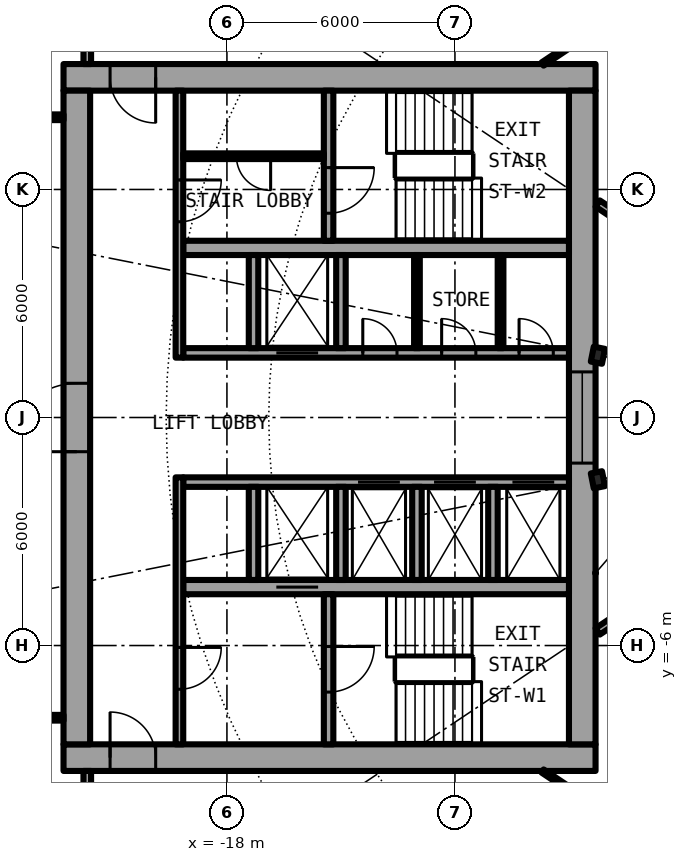
"""IFC4 building model, lengths in metres.
Left out: names, types, materials, properties, quantities, classifications, styles, units other than length and angle.
Written with IfcOpenShell. Run it as: python <this file> out.ifc"""

import sys

from ifc_helpers import new_model, si_unit, direction, frame, frame_2d, origin, origin_2d, place, context, subcontext, project, spatial, rectangle, i_section, extrude, element, fill, save


model = new_model("IFC4")
c1 = context("Model", 3, precision=1e-05, world=origin(), true_north=direction((0.0, 1.0)))
c2 = subcontext(c1, "Body", "Model", "MODEL_VIEW")
j1 = project(units=[si_unit("LENGTHUNIT", "METRE"), si_unit("PLANEANGLEUNIT", "RADIAN")], contexts=[c1])
p1 = place(None, origin())
s1 = spatial("IfcSite", under=j1, at=p1, CompositionType="ELEMENT")
p2 = place(p1, origin())
s2 = spatial("IfcBuilding", under=s1, at=p2, CompositionType="ELEMENT")
p3 = place(p2, frame((0.0, 0.0, 88.0)))
s3 = spatial("IfcBuildingStorey", under=s2, at=p3, CompositionType="ELEMENT", Elevation=88.0)
for number, where, z_axis, x_axis in (
    (1, (-8.239, 1.639, 0.0), (0.0, 0.0, 1.0), (-0.981, 0.195, 0.0)),
    (2, (-8.239, -1.639, 0.0), (0.0, 0.0, 1.0), (-0.981, -0.195, 0.0)),
):
    element("IfcColumn", number, at=place(p3, frame(where, z_axis=z_axis, x_axis=x_axis)), inside=s3, PredefinedType="COLUMN", context=c2, shape_type="SweptSolid", body=[
        extrude(i_section(OverallWidth=0.3, OverallDepth=0.4, WebThickness=0.013, FlangeThickness=0.024, FilletRadius=0.027, at=origin_2d()), origin(), (0.0, 0.0, 1.0), 3.05),
    ])
p4 = place(p3, frame((-22.3, -8.95, 0.0), z_axis=(0.0, 0.0, 1.0), x_axis=(1.0, 0.0, 0.0)))
e3 = element("IfcWall", 3, at=p4, inside=s3, PredefinedType="SHEAR", context=c2, shape_type="SweptSolid", body=[
    extrude(rectangle(XDim=14.0, YDim=0.7, at=frame_2d((7.0, 0.0))), origin(), (0.0, 0.0, 1.0), 3.05),
])
p5 = place(p4, frame((1.225, 0.0, 0.0)))
e4 = element("IfcOpeningElement", 4, at=p5, cuts=e3, PredefinedType="OPENING", context=c2, shape_type="SweptSolid", body=[
    extrude(rectangle(XDim=1.2, YDim=2.3, at=frame_2d((0.6, 1.15))), frame((0.0, 0.36, 0.0), z_axis=(0.0, -1.0, 0.0), x_axis=(1.0, 0.0, 0.0)), (0.0, 0.0, 1.0), 0.72),
])
p6 = place(p3, frame((-8.3, 8.95, 0.0), z_axis=(0.0, 0.0, 1.0), x_axis=(-1.0, 0.0, 0.0)))
e5 = element("IfcWall", 5, at=p6, inside=s3, PredefinedType="SHEAR", context=c2, shape_type="SweptSolid", body=[
    extrude(rectangle(XDim=14.0, YDim=0.7, at=frame_2d((7.0, 0.0))), origin(), (0.0, 0.0, 1.0), 3.05),
])
p7 = place(p6, frame((11.575, 0.0, 0.0)))
e6 = element("IfcOpeningElement", 6, at=p7, cuts=e5, PredefinedType="OPENING", context=c2, shape_type="SweptSolid", body=[
    extrude(rectangle(XDim=1.2, YDim=2.3, at=frame_2d((0.6, 1.15))), frame((0.0, 0.36, 0.0), z_axis=(0.0, -1.0, 0.0), x_axis=(1.0, 0.0, 0.0)), (0.0, 0.0, 1.0), 0.72),
])
p8 = place(p3, frame((-21.95, -8.6, 0.0), z_axis=(0.0, 0.0, 1.0), x_axis=(0.0, 1.0, 0.0)))
e7 = element("IfcWall", 7, at=p8, inside=s3, PredefinedType="SHEAR", context=c2, shape_type="SweptSolid", body=[
    extrude(rectangle(XDim=17.2, YDim=0.7, at=frame_2d((8.6, 0.0))), origin(), (0.0, 0.0, 1.0), 3.05),
])
p9 = place(p8, frame((7.7, 0.0, 0.0)))
e8 = element("IfcOpeningElement", 8, at=p9, cuts=e7, PredefinedType="OPENING", context=c2, shape_type="SweptSolid", body=[
    extrude(rectangle(XDim=1.8, YDim=2.3, at=frame_2d((0.9, 1.15))), frame((0.0, 0.36, 0.0), z_axis=(0.0, -1.0, 0.0), x_axis=(1.0, 0.0, 0.0)), (0.0, 0.0, 1.0), 0.72),
])
p10 = place(p3, frame((-8.65, 8.6, 0.0), z_axis=(0.0, 0.0, 1.0), x_axis=(0.0, -1.0, 0.0)))
e9 = element("IfcWall", 9, at=p10, inside=s3, PredefinedType="SHEAR", context=c2, shape_type="SweptSolid", body=[
    extrude(rectangle(XDim=17.2, YDim=0.7, at=frame_2d((8.6, 0.0))), origin(), (0.0, 0.0, 1.0), 3.05),
])
p11 = place(p10, frame((7.4, 0.0, 0.1)))
e10 = element("IfcOpeningElement", 10, at=p11, cuts=e9, PredefinedType="OPENING", context=c2, shape_type="SweptSolid", body=[
    extrude(rectangle(XDim=2.4, YDim=2.2, at=frame_2d((1.2, 1.1))), frame((0.0, 0.36, 0.0), z_axis=(0.0, -1.0, 0.0), x_axis=(1.0, 0.0, 0.0)), (0.0, 0.0, 1.0), 0.72),
])
p12 = place(p3, frame((-9.0, -1.7, 0.0), z_axis=(0.0, 0.0, 1.0), x_axis=(-1.0, 0.0, 0.0)))
e11 = element("IfcWall", 11, at=p12, inside=s3, PredefinedType="SHEAR", context=c2, shape_type="SweptSolid", body=[
    extrude(rectangle(XDim=10.15, YDim=0.25, at=frame_2d((5.075, 0.0))), origin(), (0.0, 0.0, 1.0), 3.05),
])
p13 = place(p12, frame((0.387, 0.0, 0.0)))
e12 = element("IfcOpeningElement", 12, at=p13, cuts=e11, PredefinedType="OPENING", context=c2, shape_type="SweptSolid", body=[
    extrude(rectangle(XDim=1.1, YDim=2.3, at=frame_2d((0.55, 1.15))), frame((0.0, 0.135, 0.0), z_axis=(0.0, -1.0, 0.0), x_axis=(1.0, 0.0, 0.0)), (0.0, 0.0, 1.0), 0.27),
])
p14 = place(p12, frame((2.45, 0.0, 0.0)))
e13 = element("IfcOpeningElement", 13, at=p14, cuts=e11, PredefinedType="OPENING", context=c2, shape_type="SweptSolid", body=[
    extrude(rectangle(XDim=1.1, YDim=2.3, at=frame_2d((0.55, 1.15))), frame((0.0, 0.135, 0.0), z_axis=(0.0, -1.0, 0.0), x_axis=(1.0, 0.0, 0.0)), (0.0, 0.0, 1.0), 0.27),
])
p15 = place(p12, frame((4.45, 0.0, 0.0)))
e14 = element("IfcOpeningElement", 14, at=p15, cuts=e11, PredefinedType="OPENING", context=c2, shape_type="SweptSolid", body=[
    extrude(rectangle(XDim=1.1, YDim=2.3, at=frame_2d((0.55, 1.15))), frame((0.0, 0.135, 0.0), z_axis=(0.0, -1.0, 0.0), x_axis=(1.0, 0.0, 0.0)), (0.0, 0.0, 1.0), 0.27),
])
p16 = place(p3, frame((-9.0, -4.462, 0.0), z_axis=(0.0, 0.0, 1.0), x_axis=(-1.0, 0.0, 0.0)))
e15 = element("IfcWall", 15, at=p16, inside=s3, PredefinedType="SHEAR", context=c2, shape_type="SweptSolid", body=[
    extrude(rectangle(XDim=10.15, YDim=0.375, at=frame_2d((5.075, 0.0))), origin(), (0.0, 0.0, 1.0), 3.05),
])
p17 = place(p16, frame((6.6, 0.0, 0.0)))
e16 = element("IfcOpeningElement", 16, at=p17, cuts=e15, PredefinedType="OPENING", context=c2, shape_type="SweptSolid", body=[
    extrude(rectangle(XDim=1.1, YDim=2.3, at=frame_2d((0.55, 1.15))), frame((0.0, 0.198, 0.0), z_axis=(0.0, -1.0, 0.0), x_axis=(1.0, 0.0, 0.0)), (0.0, 0.0, 1.0), 0.395),
])
p18 = place(p3, frame((-15.325, -4.65, 0.0), z_axis=(0.0, 0.0, 1.0), x_axis=(0.0, -1.0, 0.0)))
e17 = element("IfcWall", 17, at=p18, inside=s3, PredefinedType="SHEAR", context=c2, shape_type="SweptSolid", body=[
    extrude(rectangle(XDim=3.95, YDim=0.25, at=frame_2d((1.975, 0.0))), origin(), (0.0, 0.0, 1.0), 3.05),
])
p19 = place(p18, frame((1.375, 0.0, 0.0)))
e18 = element("IfcOpeningElement", 18, at=p19, cuts=e17, PredefinedType="OPENING", context=c2, shape_type="SweptSolid", body=[
    extrude(rectangle(XDim=1.2, YDim=2.3, at=frame_2d((0.6, 1.15))), frame((0.0, 0.135, 0.0), z_axis=(0.0, -1.0, 0.0), x_axis=(1.0, 0.0, 0.0)), (0.0, 0.0, 1.0), 0.27),
])
for number, where, z_axis, x_axis in (
    (19, (-15.0, -1.825, 0.0), (0.0, 0.0, 1.0), (0.0, -1.0, 0.0)),
    (20, (-17.3, -1.825, 0.0), (0.0, 0.0, 1.0), (0.0, -1.0, 0.0)),
):
    element("IfcWall", number, at=place(p3, frame(where, z_axis=z_axis, x_axis=x_axis)), inside=s3, PredefinedType="SOLIDWALL", context=c2, shape_type="SweptSolid", body=[
        extrude(rectangle(XDim=2.45, YDim=0.25, at=frame_2d((1.225, 0.0))), origin(), (0.0, 0.0, 1.0), 2.7),
    ])
p20 = place(p3, frame((-19.25, -1.575, 0.0), z_axis=(0.0, 0.0, 1.0), x_axis=(0.0, -1.0, 0.0)))
e21 = element("IfcWall", 21, at=p20, inside=s3, PredefinedType="SOLIDWALL", context=c2, shape_type="SweptSolid", body=[
    extrude(rectangle(XDim=7.025, YDim=0.2, at=frame_2d((3.513, 0.0))), origin(), (0.0, 0.0, 1.0), 2.7),
])
p21 = place(p20, frame((4.475, 0.0, 0.0)))
e22 = element("IfcOpeningElement", 22, at=p21, cuts=e21, PredefinedType="OPENING", context=c2, shape_type="SweptSolid", body=[
    extrude(rectangle(XDim=1.1, YDim=2.3, at=frame_2d((0.55, 1.15))), frame((0.0, 0.11, 0.0), z_axis=(0.0, -1.0, 0.0), x_axis=(1.0, 0.0, 0.0)), (0.0, 0.0, 1.0), 0.22),
])
p22 = place(p3, frame((-19.15, 1.7, 0.0), z_axis=(0.0, 0.0, 1.0), x_axis=(1.0, 0.0, 0.0)))
e23 = element("IfcWall", 23, at=p22, inside=s3, PredefinedType="SHEAR", context=c2, shape_type="SweptSolid", body=[
    extrude(rectangle(XDim=10.15, YDim=0.25, at=frame_2d((5.075, 0.0))), origin(), (0.0, 0.0, 1.0), 3.05),
])
p23 = place(p22, frame((2.45, 0.0, 0.0)))
e24 = element("IfcOpeningElement", 24, at=p23, cuts=e23, PredefinedType="OPENING", context=c2, shape_type="SweptSolid", body=[
    extrude(rectangle(XDim=1.1, YDim=2.3, at=frame_2d((0.55, 1.15))), frame((0.0, 0.135, 0.0), z_axis=(0.0, -1.0, 0.0), x_axis=(1.0, 0.0, 0.0)), (0.0, 0.0, 1.0), 0.27),
])
p24 = place(p22, frame((8.837, 0.0, 0.0)))
e25 = element("IfcOpeningElement", 25, at=p24, cuts=e23, PredefinedType="OPENING", context=c2, shape_type="SweptSolid", body=[
    extrude(rectangle(XDim=0.9, YDim=2.3, at=frame_2d((0.45, 1.15))), frame((0.0, 0.135, 0.0), z_axis=(0.0, -1.0, 0.0), x_axis=(1.0, 0.0, 0.0)), (0.0, 0.0, 1.0), 0.27),
])
p25 = place(p22, frame((6.8, 0.0, 0.0)))
e26 = element("IfcOpeningElement", 26, at=p25, cuts=e23, PredefinedType="OPENING", context=c2, shape_type="SweptSolid", body=[
    extrude(rectangle(XDim=0.9, YDim=2.3, at=frame_2d((0.45, 1.15))), frame((0.0, 0.135, 0.0), z_axis=(0.0, -1.0, 0.0), x_axis=(1.0, 0.0, 0.0)), (0.0, 0.0, 1.0), 0.27),
])
p26 = place(p22, frame((4.725, 0.0, 0.0)))
e27 = element("IfcOpeningElement", 27, at=p26, cuts=e23, PredefinedType="OPENING", context=c2, shape_type="SweptSolid", body=[
    extrude(rectangle(XDim=0.9, YDim=2.3, at=frame_2d((0.45, 1.15))), frame((0.0, 0.135, 0.0), z_axis=(0.0, -1.0, 0.0), x_axis=(1.0, 0.0, 0.0)), (0.0, 0.0, 1.0), 0.27),
])
p27 = place(p3, frame((-9.0, 4.462, 0.0), z_axis=(0.0, 0.0, 1.0), x_axis=(-1.0, 0.0, 0.0)))
e28 = element("IfcWall", 28, at=p27, inside=s3, PredefinedType="SHEAR", context=c2, shape_type="SweptSolid", body=[
    extrude(rectangle(XDim=10.15, YDim=0.375, at=frame_2d((5.075, 0.0))), origin(), (0.0, 0.0, 1.0), 3.05),
])
p28 = place(p3, frame((-15.325, 8.6, 0.0), z_axis=(0.0, 0.0, 1.0), x_axis=(0.0, -1.0, 0.0)))
e29 = element("IfcWall", 29, at=p28, inside=s3, PredefinedType="SHEAR", context=c2, shape_type="SweptSolid", body=[
    extrude(rectangle(XDim=3.95, YDim=0.25, at=frame_2d((1.975, 0.0))), origin(), (0.0, 0.0, 1.0), 3.05),
])
p29 = place(p28, frame((2.025, 0.0, 0.0)))
e30 = element("IfcOpeningElement", 30, at=p29, cuts=e29, PredefinedType="OPENING", context=c2, shape_type="SweptSolid", body=[
    extrude(rectangle(XDim=1.2, YDim=2.3, at=frame_2d((0.6, 1.15))), frame((0.0, 0.135, 0.0), z_axis=(0.0, -1.0, 0.0), x_axis=(1.0, 0.0, 0.0)), (0.0, 0.0, 1.0), 0.27),
])
for number, where, z_axis, x_axis in (
    (31, (-15.0, 1.825, 0.0), (0.0, 0.0, 1.0), (0.0, 1.0, 0.0)),
    (32, (-17.3, 1.825, 0.0), (0.0, 0.0, 1.0), (0.0, 1.0, 0.0)),
):
    element("IfcWall", number, at=place(p3, frame(where, z_axis=z_axis, x_axis=x_axis)), inside=s3, PredefinedType="SOLIDWALL", context=c2, shape_type="SweptSolid", body=[
        extrude(rectangle(XDim=2.45, YDim=0.25, at=frame_2d((1.225, 0.0))), origin(), (0.0, 0.0, 1.0), 2.7),
    ])
p30 = place(p3, frame((-19.25, 8.6, 0.0), z_axis=(0.0, 0.0, 1.0), x_axis=(0.0, -1.0, 0.0)))
e33 = element("IfcWall", 33, at=p30, inside=s3, PredefinedType="SOLIDWALL", context=c2, shape_type="SweptSolid", body=[
    extrude(rectangle(XDim=7.025, YDim=0.2, at=frame_2d((3.513, 0.0))), origin(), (0.0, 0.0, 1.0), 2.7),
])
p31 = place(p30, frame((2.35, 0.0, 0.0)))
e34 = element("IfcOpeningElement", 34, at=p31, cuts=e33, PredefinedType="OPENING", context=c2, shape_type="SweptSolid", body=[
    extrude(rectangle(XDim=1.1, YDim=2.3, at=frame_2d((0.55, 1.15))), frame((0.0, 0.11, 0.0), z_axis=(0.0, -1.0, 0.0), x_axis=(1.0, 0.0, 0.0)), (0.0, 0.0, 1.0), 0.22),
])
for number, where, z_axis, x_axis in (
    (35, (-11.0, -1.825, 0.0), (0.0, 0.0, 1.0), (0.0, -1.0, 0.0)),
    (36, (-13.0, -1.825, 0.0), (0.0, 0.0, 1.0), (0.0, -1.0, 0.0)),
):
    element("IfcWall", number, at=place(p3, frame(where, z_axis=z_axis, x_axis=x_axis)), inside=s3, PredefinedType="SOLIDWALL", context=c2, shape_type="SweptSolid", body=[
        extrude(rectangle(XDim=2.45, YDim=0.25, at=frame_2d((1.225, 0.0))), origin(), (0.0, 0.0, 1.0), 2.7),
    ])
for number, where, z_axis, x_axis in (
    (37, (-10.8, 1.825, 0.0), (0.0, 0.0, 1.0), (0.0, 1.0, 0.0)),
    (38, (-13.0, 1.825, 0.0), (0.0, 0.0, 1.0), (0.0, 1.0, 0.0)),
):
    element("IfcWall", number, at=place(p3, frame(where, z_axis=z_axis, x_axis=x_axis)), inside=s3, PredefinedType="PARTITIONING", context=c2, shape_type="SweptSolid", body=[
        extrude(rectangle(XDim=2.45, YDim=0.15, at=frame_2d((1.225, 0.0))), origin(), (0.0, 0.0, 1.0), 2.7),
    ])
p32 = place(p3, frame((-15.45, 6.875, 0.0), z_axis=(0.0, 0.0, 1.0), x_axis=(-1.0, 0.0, 0.0)))
e39 = element("IfcWall", 39, at=p32, inside=s3, PredefinedType="PARTITIONING", context=c2, shape_type="SweptSolid", body=[
    extrude(rectangle(XDim=3.7, YDim=0.15, at=frame_2d((1.85, 0.0))), origin(), (0.0, 0.0, 1.0), 2.7),
])
p33 = place(p32, frame((1.4, 0.0, 0.0)))
e40 = element("IfcOpeningElement", 40, at=p33, cuts=e39, PredefinedType="OPENING", context=c2, shape_type="SweptSolid", body=[
    extrude(rectangle(XDim=0.9, YDim=2.3, at=frame_2d((0.45, 1.15))), frame((0.0, 0.085, 0.0), z_axis=(0.0, -1.0, 0.0), x_axis=(1.0, 0.0, 0.0)), (0.0, 0.0, 1.0), 0.17),
])
for number, where, z_axis, x_axis in (
    (41, (-22.3, 7.9, 0.0), (0.0, 0.0, 1.0), (-1.0, 0.0, 0.0)),
    (42, (-22.3, -7.9, 0.0), (0.0, 0.0, 1.0), (-1.0, 0.0, 0.0)),
):
    element("IfcWall", number, at=place(p3, frame(where, z_axis=z_axis, x_axis=x_axis)), inside=s3, PredefinedType="PARTITIONING", context=c2, shape_type="SweptSolid", body=[
        extrude(rectangle(XDim=2.64, YDim=0.15, at=frame_2d((1.32, 0.0))), origin(), (0.0, 0.0, 1.0), 2.7),
    ])
p34 = place(p3, frame((-9.693, -9.302, 0.0), z_axis=(0.0, 0.0, 1.0), x_axis=(0.831546497949, -0.555455148278, 0.0)))
e43 = element("IfcWall", 43, at=p34, inside=s3, PredefinedType="PARTITIONING", context=c2, shape_type="SweptSolid", body=[
    extrude(rectangle(XDim=4.252, YDim=0.1, at=frame_2d((2.126, 0.0))), origin(), (0.0, 0.0, 1.0), 2.7),
])
for number, where, z_axis, x_axis in (
    (44, (-6.513, -4.472, 0.0), (0.0, 0.0, 1.0), (-0.831, -0.556, 0.0)),
    (45, (-6.513, 4.472, 0.0), (0.0, 0.0, 1.0), (-0.831, 0.556, 0.0)),
):
    element("IfcWall", number, at=place(p3, frame(where, z_axis=z_axis, x_axis=x_axis)), inside=s3, PredefinedType="PARTITIONING", context=c2, shape_type="SweptSolid", body=[
        extrude(rectangle(XDim=2.082, YDim=0.2, at=frame_2d((1.041, 0.0))), origin(), (0.0, 0.0, 1.0), 2.7),
    ])
p35 = place(p3, frame((-9.695, 9.3, 0.0), z_axis=(0.0, 0.0, 1.0), x_axis=(0.831369521678, 0.555720000022, 0.0)))
e46 = element("IfcWall", 46, at=p35, inside=s3, PredefinedType="PARTITIONING", context=c2, shape_type="SweptSolid", body=[
    extrude(rectangle(XDim=4.252, YDim=0.1, at=frame_2d((2.126, 0.0))), origin(), (0.0, 0.0, 1.0), 2.7),
])
for number, where, z_axis, x_axis in (
    (47, (-21.675, -10.95, 0.0), (0.0, 0.0, 1.0), (0.0, 1.0, 0.0)),
    (48, (-21.675, 9.3, 0.0), (0.0, 0.0, 1.0), (0.0, 1.0, 0.0)),
):
    element("IfcWall", number, at=place(p3, frame(where, z_axis=z_axis, x_axis=x_axis)), inside=s3, PredefinedType="PARTITIONING", context=c2, shape_type="SweptSolid", body=[
        extrude(rectangle(XDim=1.65, YDim=0.2, at=frame_2d((0.825, 0.0))), origin(), (0.0, 0.0, 1.0), 2.7),
    ])
p36 = place(p13, origin())
e49 = element("IfcDoor", 49, at=p36, inside=s3, OperationType="DOUBLE_DOOR_SLIDING", PredefinedType="DOOR", context=c2, shape_type="SweptSolid", body=[
    extrude(rectangle(XDim=1.1, YDim=2.3, at=frame_2d((0.55, 1.15))), frame((0.0, 0.025, 0.0), z_axis=(0.0, -1.0, 0.0), x_axis=(1.0, 0.0, 0.0)), (0.0, 0.0, 1.0), 0.05),
])
fill(e12, e49)
p37 = place(p14, origin())
e50 = element("IfcDoor", 50, at=p37, inside=s3, OperationType="DOUBLE_DOOR_SLIDING", PredefinedType="DOOR", context=c2, shape_type="SweptSolid", body=[
    extrude(rectangle(XDim=1.1, YDim=2.3, at=frame_2d((0.55, 1.15))), frame((0.0, 0.025, 0.0), z_axis=(0.0, -1.0, 0.0), x_axis=(1.0, 0.0, 0.0)), (0.0, 0.0, 1.0), 0.05),
])
fill(e13, e50)
p38 = place(p15, origin())
e51 = element("IfcDoor", 51, at=p38, inside=s3, OperationType="DOUBLE_DOOR_SLIDING", PredefinedType="DOOR", context=c2, shape_type="SweptSolid", body=[
    extrude(rectangle(XDim=1.1, YDim=2.3, at=frame_2d((0.55, 1.15))), frame((0.0, 0.025, 0.0), z_axis=(0.0, -1.0, 0.0), x_axis=(1.0, 0.0, 0.0)), (0.0, 0.0, 1.0), 0.05),
])
fill(e14, e51)
p39 = place(p17, origin())
e52 = element("IfcDoor", 52, at=p39, inside=s3, OperationType="DOUBLE_DOOR_SLIDING", PredefinedType="DOOR", context=c2, shape_type="SweptSolid", body=[
    extrude(rectangle(XDim=1.1, YDim=2.3, at=frame_2d((0.55, 1.15))), frame((0.0, 0.025, 0.0), z_axis=(0.0, -1.0, 0.0), x_axis=(1.0, 0.0, 0.0)), (0.0, 0.0, 1.0), 0.05),
])
fill(e16, e52)
p40 = place(p23, origin())
e53 = element("IfcDoor", 53, at=p40, inside=s3, OperationType="DOUBLE_DOOR_SLIDING", PredefinedType="DOOR", context=c2, shape_type="SweptSolid", body=[
    extrude(rectangle(XDim=1.1, YDim=2.3, at=frame_2d((0.55, 1.15))), frame((0.0, 0.025, 0.0), z_axis=(0.0, -1.0, 0.0), x_axis=(1.0, 0.0, 0.0)), (0.0, 0.0, 1.0), 0.05),
])
fill(e24, e53)
p41 = place(p24, origin())
e54 = element("IfcDoor", 54, at=p41, inside=s3, OperationType="SINGLE_SWING_LEFT", PredefinedType="DOOR", context=c2, shape_type="SweptSolid", body=[
    extrude(rectangle(XDim=0.9, YDim=2.3, at=frame_2d((0.45, 1.15))), frame((0.0, 0.025, 0.0), z_axis=(0.0, -1.0, 0.0), x_axis=(1.0, 0.0, 0.0)), (0.0, 0.0, 1.0), 0.05),
])
fill(e25, e54)
p42 = place(p25, origin())
e55 = element("IfcDoor", 55, at=p42, inside=s3, OperationType="SINGLE_SWING_LEFT", PredefinedType="DOOR", context=c2, shape_type="SweptSolid", body=[
    extrude(rectangle(XDim=0.9, YDim=2.3, at=frame_2d((0.45, 1.15))), frame((0.0, 0.025, 0.0), z_axis=(0.0, -1.0, 0.0), x_axis=(1.0, 0.0, 0.0)), (0.0, 0.0, 1.0), 0.05),
])
fill(e26, e55)
p43 = place(p26, origin())
e56 = element("IfcDoor", 56, at=p43, inside=s3, OperationType="SINGLE_SWING_LEFT", PredefinedType="DOOR", context=c2, shape_type="SweptSolid", body=[
    extrude(rectangle(XDim=0.9, YDim=2.3, at=frame_2d((0.45, 1.15))), frame((0.0, 0.025, 0.0), z_axis=(0.0, -1.0, 0.0), x_axis=(1.0, 0.0, 0.0)), (0.0, 0.0, 1.0), 0.05),
])
fill(e27, e56)
p44 = place(p33, origin())
e57 = element("IfcDoor", 57, at=p44, inside=s3, OperationType="SINGLE_SWING_LEFT", PredefinedType="DOOR", context=c2, shape_type="SweptSolid", body=[
    extrude(rectangle(XDim=0.9, YDim=2.3, at=frame_2d((0.45, 1.15))), frame((0.0, 0.025, 0.0), z_axis=(0.0, -1.0, 0.0), x_axis=(1.0, 0.0, 0.0)), (0.0, 0.0, 1.0), 0.05),
])
fill(e40, e57)
p45 = place(p19, origin())
e58 = element("IfcDoor", 58, at=p45, inside=s3, OperationType="SINGLE_SWING_LEFT", PredefinedType="DOOR", context=c2, shape_type="SweptSolid", body=[
    extrude(rectangle(XDim=1.2, YDim=2.3, at=frame_2d((0.6, 1.15))), frame((0.0, 0.025, 0.0), z_axis=(0.0, -1.0, 0.0), x_axis=(1.0, 0.0, 0.0)), (0.0, 0.0, 1.0), 0.05),
])
fill(e18, e58)
p46 = place(p29, origin())
e59 = element("IfcDoor", 59, at=p46, inside=s3, OperationType="SINGLE_SWING_LEFT", PredefinedType="DOOR", context=c2, shape_type="SweptSolid", body=[
    extrude(rectangle(XDim=1.2, YDim=2.3, at=frame_2d((0.6, 1.15))), frame((0.0, 0.025, 0.0), z_axis=(0.0, -1.0, 0.0), x_axis=(1.0, 0.0, 0.0)), (0.0, 0.0, 1.0), 0.05),
])
fill(e30, e59)
p47 = place(p21, origin())
e60 = element("IfcDoor", 60, at=p47, inside=s3, OperationType="SINGLE_SWING_LEFT", PredefinedType="DOOR", context=c2, shape_type="SweptSolid", body=[
    extrude(rectangle(XDim=1.1, YDim=2.3, at=frame_2d((0.55, 1.15))), frame((0.0, 0.025, 0.0), z_axis=(0.0, -1.0, 0.0), x_axis=(1.0, 0.0, 0.0)), (0.0, 0.0, 1.0), 0.05),
])
fill(e22, e60)
p48 = place(p31, origin())
e61 = element("IfcDoor", 61, at=p48, inside=s3, OperationType="SINGLE_SWING_RIGHT", PredefinedType="DOOR", context=c2, shape_type="SweptSolid", body=[
    extrude(rectangle(XDim=1.1, YDim=2.3, at=frame_2d((0.55, 1.15))), frame((0.0, 0.025, 0.0), z_axis=(0.0, -1.0, 0.0), x_axis=(1.0, 0.0, 0.0)), (0.0, 0.0, 1.0), 0.05),
])
fill(e34, e61)
p49 = place(p5, origin())
e62 = element("IfcDoor", 62, at=p49, inside=s3, OperationType="SINGLE_SWING_RIGHT", PredefinedType="DOOR", context=c2, shape_type="SweptSolid", body=[
    extrude(rectangle(XDim=1.2, YDim=2.3, at=frame_2d((0.6, 1.15))), frame((0.0, 0.025, 0.0), z_axis=(0.0, -1.0, 0.0), x_axis=(1.0, 0.0, 0.0)), (0.0, 0.0, 1.0), 0.05),
])
fill(e4, e62)
p50 = place(p7, origin())
e63 = element("IfcDoor", 63, at=p50, inside=s3, OperationType="SINGLE_SWING_LEFT", PredefinedType="DOOR", context=c2, shape_type="SweptSolid", body=[
    extrude(rectangle(XDim=1.2, YDim=2.3, at=frame_2d((0.6, 1.15))), frame((0.0, 0.025, 0.0), z_axis=(0.0, -1.0, 0.0), x_axis=(1.0, 0.0, 0.0)), (0.0, 0.0, 1.0), 0.05),
])
fill(e6, e63)
p51 = place(p9, origin())
e64 = element("IfcDoor", 64, at=p51, inside=s3, OperationType="SINGLE_SWING_LEFT", PredefinedType="DOOR", context=c2, shape_type="SweptSolid", body=[
    extrude(rectangle(XDim=1.8, YDim=2.3, at=frame_2d((0.9, 1.15))), frame((0.0, 0.025, 0.0), z_axis=(0.0, -1.0, 0.0), x_axis=(1.0, 0.0, 0.0)), (0.0, 0.0, 1.0), 0.05),
])
fill(e8, e64)
p52 = place(p11, origin())
e65 = element("IfcWindow", 65, at=p52, inside=s3, PartitioningType="SINGLE_PANEL", PredefinedType="WINDOW", context=c2, shape_type="SweptSolid", body=[
    extrude(rectangle(XDim=2.4, YDim=2.2, at=frame_2d((1.2, 1.1))), frame((0.0, 0.03, 0.0), z_axis=(0.0, -1.0, 0.0), x_axis=(1.0, 0.0, 0.0)), (0.0, 0.0, 1.0), 0.06),
])
fill(e10, e65)
save(model, sys.argv[1])
